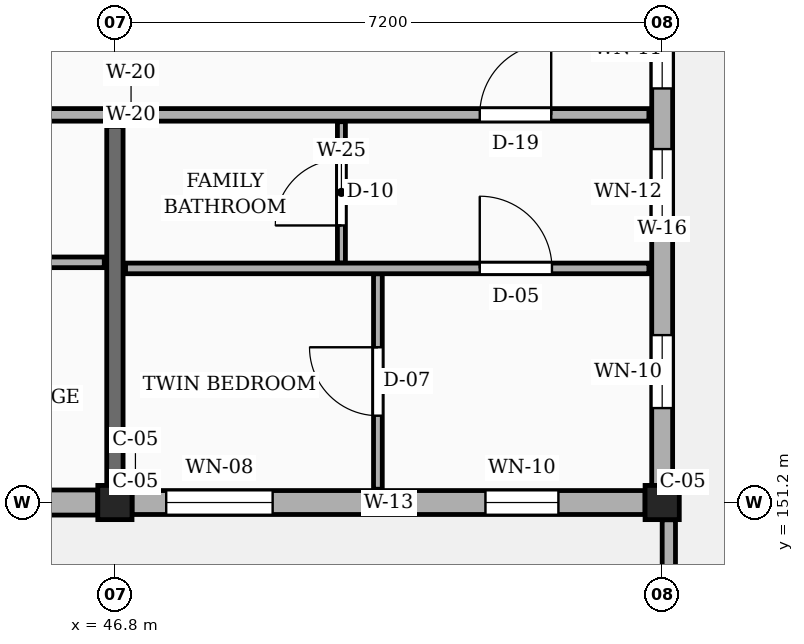
"""IFC4 building model, lengths in metres.
Left out: names, types, materials, properties, quantities, classifications, styles, units other than length and angle.
Written with IfcOpenShell. Run it as: python <this file> out.ifc"""

import sys

from ifc_helpers import new_model, si_unit, direction, frame, frame_2d, origin, origin_2d, place, context, subcontext, project, spatial, rectangle, extrude, element, fill, save


model = new_model("IFC4")
c1 = context("Model", 3, precision=1e-05, world=origin(), true_north=direction((0.0, 1.0)))
c2 = subcontext(c1, "Body", "Model", "MODEL_VIEW")
j1 = project(units=[si_unit("LENGTHUNIT", "METRE"), si_unit("PLANEANGLEUNIT", "RADIAN")], contexts=[c1])
p1 = place(None, origin())
s1 = spatial("IfcSite", under=j1, at=p1, CompositionType="ELEMENT")
p2 = place(p1, origin())
s2 = spatial("IfcBuilding", under=s1, at=p2, CompositionType="ELEMENT")
p3 = place(p2, frame((0.0, 0.0, 36.0)))
s3 = spatial("IfcBuildingStorey", under=s2, at=p3, CompositionType="ELEMENT", Elevation=36.0)
for number, where, z_axis, x_axis in (
    (1, (46.8, 151.2, 0.0), (0.0, 0.0, 1.0), (1.0, 0.0, 0.0)),
    (2, (54.0, 151.2, 0.0), (0.0, 0.0, 1.0), (1.0, 0.0, 0.0)),
):
    element("IfcColumn", number, at=place(p3, frame(where, z_axis=z_axis, x_axis=x_axis)), inside=s3, PredefinedType="COLUMN", context=c2, shape_type="SweptSolid", body=[
        extrude(rectangle(XDim=0.45, YDim=0.45, at=origin_2d()), origin(), (0.0, 0.0, 1.0), 3.15),
    ])
p4 = place(p3, frame((46.8, 151.425, 0.0), z_axis=(0.0, 0.0, 1.0), x_axis=(0.0, 1.0, 0.0)))
e3 = element("IfcWall", 3, at=p4, inside=s3, PredefinedType="SOLIDWALL", context=c2, shape_type="SweptSolid", body=[
    extrude(rectangle(XDim=4.725, YDim=0.215, at=frame_2d((2.362, 0.0))), origin(), (0.0, 0.0, 1.0), 2.185),
])
p5 = place(p3, frame((39.825, 151.2, 0.0), z_axis=(0.0, 0.0, 1.0), x_axis=(1.0, 0.0, 0.0)))
e4 = element("IfcWall", 4, at=p5, inside=s3, PredefinedType="SOLIDWALL", context=c2, shape_type="SweptSolid", body=[
    extrude(rectangle(XDim=6.75, YDim=0.33, at=frame_2d((3.375, 0.0))), origin(), (0.0, 0.0, 1.0), 2.455),
])
p6 = place(p5, frame((0.45, 0.0, 0.78)))
e5 = element("IfcOpeningElement", 5, at=p6, cuts=e4, PredefinedType="OPENING", context=c2, shape_type="SweptSolid", body=[
    extrude(rectangle(XDim=1.24, YDim=1.15, at=frame_2d((0.62, 0.575))), frame((0.0, 0.175, 0.0), z_axis=(0.0, -1.0, 0.0), x_axis=(1.0, 0.0, 0.0)), (0.0, 0.0, 1.0), 0.35),
])
p7 = place(p5, frame((4.65, 0.0, 0.78)))
e6 = element("IfcOpeningElement", 6, at=p7, cuts=e4, PredefinedType="OPENING", context=c2, shape_type="SweptSolid", body=[
    extrude(rectangle(XDim=1.4, YDim=1.15, at=frame_2d((0.7, 0.575))), frame((0.0, 0.175, 0.0), z_axis=(0.0, -1.0, 0.0), x_axis=(1.0, 0.0, 0.0)), (0.0, 0.0, 1.0), 0.35),
])
p8 = place(p3, frame((47.025, 151.2, 0.0), z_axis=(0.0, 0.0, 1.0), x_axis=(1.0, 0.0, 0.0)))
e7 = element("IfcWall", 7, at=p8, inside=s3, PredefinedType="SOLIDWALL", context=c2, shape_type="SweptSolid", body=[
    extrude(rectangle(XDim=6.75, YDim=0.315, at=frame_2d((3.375, 0.0))), origin(), (0.0, 0.0, 1.0), 2.455),
])
p9 = place(p8, frame((0.45, 0.0, 0.78)))
e8 = element("IfcOpeningElement", 8, at=p9, cuts=e7, PredefinedType="OPENING", context=c2, shape_type="SweptSolid", body=[
    extrude(rectangle(XDim=1.4, YDim=1.15, at=frame_2d((0.7, 0.575))), frame((0.0, 0.167, 0.0), z_axis=(0.0, -1.0, 0.0), x_axis=(1.0, 0.0, 0.0)), (0.0, 0.0, 1.0), 0.335),
])
p10 = place(p8, frame((4.65, 0.0, 0.78)))
e9 = element("IfcOpeningElement", 9, at=p10, cuts=e7, PredefinedType="OPENING", context=c2, shape_type="SweptSolid", body=[
    extrude(rectangle(XDim=0.96, YDim=1.26, at=frame_2d((0.48, 0.63))), frame((0.0, 0.167, 0.0), z_axis=(0.0, -1.0, 0.0), x_axis=(1.0, 0.0, 0.0)), (0.0, 0.0, 1.0), 0.335),
])
p11 = place(p3, frame((54.0, 151.425, 0.0), z_axis=(0.0, 0.0, 1.0), x_axis=(0.0, 1.0, 0.0)))
e10 = element("IfcWall", 10, at=p11, inside=s3, PredefinedType="SOLIDWALL", context=c2, shape_type="SweptSolid", body=[
    extrude(rectangle(XDim=6.75, YDim=0.275, at=frame_2d((3.375, 0.0))), origin(), (0.0, 0.0, 1.0), 2.455),
])
p12 = place(p11, frame((1.018, 0.0, 0.78)))
e11 = element("IfcOpeningElement", 11, at=p12, cuts=e10, PredefinedType="OPENING", context=c2, shape_type="SweptSolid", body=[
    extrude(rectangle(XDim=0.96, YDim=1.26, at=frame_2d((0.48, 0.63))), frame((0.0, 0.147, 0.0), z_axis=(0.0, -1.0, 0.0), x_axis=(1.0, 0.0, 0.0)), (0.0, 0.0, 1.0), 0.295),
])
p13 = place(p11, frame((3.305, 0.0, 0.78)))
e12 = element("IfcOpeningElement", 12, at=p13, cuts=e10, PredefinedType="OPENING", context=c2, shape_type="SweptSolid", body=[
    extrude(rectangle(XDim=1.12, YDim=1.26, at=frame_2d((0.56, 0.63))), frame((0.0, 0.147, 0.0), z_axis=(0.0, -1.0, 0.0), x_axis=(1.0, 0.0, 0.0)), (0.0, 0.0, 1.0), 0.295),
])
p14 = place(p11, frame((5.222, 0.0, 0.78)))
e13 = element("IfcOpeningElement", 13, at=p14, cuts=e10, PredefinedType="OPENING", context=c2, shape_type="SweptSolid", body=[
    extrude(rectangle(XDim=1.04, YDim=1.26, at=frame_2d((0.52, 0.63))), frame((0.0, 0.147, 0.0), z_axis=(0.0, -1.0, 0.0), x_axis=(1.0, 0.0, 0.0)), (0.0, 0.0, 1.0), 0.295),
])
p15 = place(p3, frame((54.087, 144.175, 0.0), z_axis=(0.0, 0.0, 1.0), x_axis=(0.0, 1.0, 0.0)))
e14 = element("IfcWall", 14, at=p15, inside=s3, PredefinedType="PARAPET", context=c2, shape_type="SweptSolid", body=[
    extrude(rectangle(XDim=6.798, YDim=0.175, at=frame_2d((3.399, 0.0))), origin(), (0.0, 0.0, 1.0), 1.1),
])
p16 = place(p3, frame((39.62, 156.3, 0.0), z_axis=(0.0, 0.0, 1.0), x_axis=(1.0, 0.0, 0.0)))
e15 = element("IfcWall", 15, at=p16, inside=s3, PredefinedType="PARTITIONING", context=c2, shape_type="SweptSolid", body=[
    extrude(rectangle(XDim=7.16, YDim=0.165, at=frame_2d((3.58, 0.0))), origin(), (0.0, 0.0, 1.0), 2.32),
])
p17 = place(p16, frame((4.78, 0.0, 0.0)))
e16 = element("IfcOpeningElement", 16, at=p17, cuts=e15, PredefinedType="OPENING", context=c2, shape_type="SweptSolid", body=[
    extrude(rectangle(XDim=1.0, YDim=2.15, at=frame_2d((0.5, 1.075))), frame((0.0, 0.093, 0.0), z_axis=(0.0, -1.0, 0.0), x_axis=(1.0, 0.0, 0.0)), (0.0, 0.0, 1.0), 0.185),
])
p18 = place(p3, frame((46.82, 156.3, 0.0), z_axis=(0.0, 0.0, 1.0), x_axis=(1.0, 0.0, 0.0)))
e17 = element("IfcWall", 17, at=p18, inside=s3, PredefinedType="PARTITIONING", context=c2, shape_type="SweptSolid", body=[
    extrude(rectangle(XDim=7.005, YDim=0.165, at=frame_2d((3.502, 0.0))), origin(), (0.0, 0.0, 1.0), 2.32),
])
p19 = place(p18, frame((4.78, 0.0, 0.0)))
e18 = element("IfcOpeningElement", 18, at=p19, cuts=e17, PredefinedType="OPENING", context=c2, shape_type="SweptSolid", body=[
    extrude(rectangle(XDim=0.94, YDim=2.12, at=frame_2d((0.47, 1.06))), frame((0.0, 0.093, 0.0), z_axis=(0.0, -1.0, 0.0), x_axis=(1.0, 0.0, 0.0)), (0.0, 0.0, 1.0), 0.185),
])
p20 = place(p3, frame((39.74, 154.36, 0.0), z_axis=(0.0, 0.0, 1.0), x_axis=(1.0, 0.0, 0.0)))
e19 = element("IfcWall", 19, at=p20, inside=s3, PredefinedType="PARTITIONING", context=c2, shape_type="SweptSolid", body=[
    extrude(rectangle(XDim=6.92, YDim=0.14, at=frame_2d((3.46, 0.0))), origin(), (0.0, 0.0, 1.0), 2.32),
])
p21 = place(p20, frame((4.66, 0.0, 0.0)))
e20 = element("IfcOpeningElement", 20, at=p21, cuts=e19, PredefinedType="OPENING", context=c2, shape_type="SweptSolid", body=[
    extrude(rectangle(XDim=0.92, YDim=2.1, at=frame_2d((0.46, 1.05))), frame((0.0, 0.08, 0.0), z_axis=(0.0, -1.0, 0.0), x_axis=(1.0, 0.0, 0.0)), (0.0, 0.0, 1.0), 0.16),
])
p22 = place(p3, frame((50.26, 151.375, 0.0), z_axis=(0.0, 0.0, 1.0), x_axis=(0.0, 1.0, 0.0)))
e21 = element("IfcWall", 21, at=p22, inside=s3, PredefinedType="PARTITIONING", context=c2, shape_type="SweptSolid", body=[
    extrude(rectangle(XDim=2.835, YDim=0.115, at=frame_2d((1.417, 0.0))), origin(), (0.0, 0.0, 1.0), 2.32),
])
p23 = place(p22, frame((0.968, 0.0, 0.0)))
e22 = element("IfcOpeningElement", 22, at=p23, cuts=e21, PredefinedType="OPENING", context=c2, shape_type="SweptSolid", body=[
    extrude(rectangle(XDim=0.9, YDim=2.1, at=frame_2d((0.45, 1.05))), frame((0.0, 0.067, 0.0), z_axis=(0.0, -1.0, 0.0), x_axis=(1.0, 0.0, 0.0)), (0.0, 0.0, 1.0), 0.135),
])
p24 = place(p3, frame((49.78, 154.35, 0.0), z_axis=(0.0, 0.0, 1.0), x_axis=(0.0, 1.0, 0.0)))
e23 = element("IfcWall", 23, at=p24, inside=s3, PredefinedType="PARTITIONING", context=c2, shape_type="SweptSolid", body=[
    extrude(rectangle(XDim=1.86, YDim=0.105, at=frame_2d((0.93, 0.0))), origin(), (0.0, 0.0, 1.0), 2.32),
])
p25 = place(p24, frame((0.495, 0.0, 0.0)))
e24 = element("IfcOpeningElement", 24, at=p25, cuts=e23, PredefinedType="OPENING", context=c2, shape_type="SweptSolid", body=[
    extrude(rectangle(XDim=0.87, YDim=2.05, at=frame_2d((0.435, 1.025))), frame((0.0, 0.062, 0.0), z_axis=(0.0, -1.0, 0.0), x_axis=(1.0, 0.0, 0.0)), (0.0, 0.0, 1.0), 0.125),
])
p26 = place(p3, frame((46.94, 154.28, 0.0), z_axis=(0.0, 0.0, 1.0), x_axis=(1.0, 0.0, 0.0)))
e25 = element("IfcWall", 25, at=p26, inside=s3, PredefinedType="PARTITIONING", context=c2, shape_type="SweptSolid", body=[
    extrude(rectangle(XDim=6.885, YDim=0.14, at=frame_2d((3.442, 0.0))), origin(), (0.0, 0.0, 1.0), 2.32),
])
p27 = place(p26, frame((4.66, 0.0, 0.0)))
e26 = element("IfcOpeningElement", 26, at=p27, cuts=e25, PredefinedType="OPENING", context=c2, shape_type="SweptSolid", body=[
    extrude(rectangle(XDim=0.95, YDim=2.1, at=frame_2d((0.475, 1.05))), frame((0.0, 0.08, 0.0), z_axis=(0.0, -1.0, 0.0), x_axis=(1.0, 0.0, 0.0)), (0.0, 0.0, 1.0), 0.16),
])
p28 = place(p9, origin())
e27 = element("IfcWindow", 27, at=p28, inside=s3, PartitioningType="SINGLE_PANEL", PredefinedType="WINDOW", context=c2, shape_type="SweptSolid", body=[
    extrude(rectangle(XDim=1.4, YDim=1.15, at=frame_2d((0.7, 0.575))), frame((0.0, 0.03, 0.0), z_axis=(0.0, -1.0, 0.0), x_axis=(1.0, 0.0, 0.0)), (0.0, 0.0, 1.0), 0.06),
])
fill(e8, e27)
p29 = place(p10, origin())
e28 = element("IfcWindow", 28, at=p29, inside=s3, PartitioningType="SINGLE_PANEL", PredefinedType="WINDOW", context=c2, shape_type="SweptSolid", body=[
    extrude(rectangle(XDim=0.96, YDim=1.26, at=frame_2d((0.48, 0.63))), frame((0.0, 0.03, 0.0), z_axis=(0.0, -1.0, 0.0), x_axis=(1.0, 0.0, 0.0)), (0.0, 0.0, 1.0), 0.06),
])
fill(e9, e28)
p30 = place(p12, origin())
e29 = element("IfcWindow", 29, at=p30, inside=s3, PartitioningType="SINGLE_PANEL", PredefinedType="WINDOW", context=c2, shape_type="SweptSolid", body=[
    extrude(rectangle(XDim=0.96, YDim=1.26, at=frame_2d((0.48, 0.63))), frame((0.0, 0.03, 0.0), z_axis=(0.0, -1.0, 0.0), x_axis=(1.0, 0.0, 0.0)), (0.0, 0.0, 1.0), 0.06),
])
fill(e11, e29)
p31 = place(p13, origin())
e30 = element("IfcWindow", 30, at=p31, inside=s3, PartitioningType="SINGLE_PANEL", PredefinedType="WINDOW", context=c2, shape_type="SweptSolid", body=[
    extrude(rectangle(XDim=1.12, YDim=1.26, at=frame_2d((0.56, 0.63))), frame((0.0, 0.03, 0.0), z_axis=(0.0, -1.0, 0.0), x_axis=(1.0, 0.0, 0.0)), (0.0, 0.0, 1.0), 0.06),
])
fill(e12, e30)
p32 = place(p14, origin())
e31 = element("IfcWindow", 31, at=p32, inside=s3, PartitioningType="SINGLE_PANEL", PredefinedType="WINDOW", context=c2, shape_type="SweptSolid", body=[
    extrude(rectangle(XDim=1.04, YDim=1.26, at=frame_2d((0.52, 0.63))), frame((0.0, 0.03, 0.0), z_axis=(0.0, -1.0, 0.0), x_axis=(1.0, 0.0, 0.0)), (0.0, 0.0, 1.0), 0.06),
])
fill(e13, e31)
p33 = place(p19, origin())
e32 = element("IfcDoor", 32, at=p33, inside=s3, OperationType="SINGLE_SWING_RIGHT", PredefinedType="DOOR", context=c2, shape_type="SweptSolid", body=[
    extrude(rectangle(XDim=0.94, YDim=2.12, at=frame_2d((0.47, 1.06))), frame((0.0, 0.025, 0.0), z_axis=(0.0, -1.0, 0.0), x_axis=(1.0, 0.0, 0.0)), (0.0, 0.0, 1.0), 0.05),
])
fill(e18, e32)
p34 = place(p23, origin())
e33 = element("IfcDoor", 33, at=p34, inside=s3, OperationType="SINGLE_SWING_RIGHT", PredefinedType="DOOR", context=c2, shape_type="SweptSolid", body=[
    extrude(rectangle(XDim=0.9, YDim=2.1, at=frame_2d((0.45, 1.05))), frame((0.0, 0.025, 0.0), z_axis=(0.0, -1.0, 0.0), x_axis=(1.0, 0.0, 0.0)), (0.0, 0.0, 1.0), 0.05),
])
fill(e22, e33)
p35 = place(p25, origin())
e34 = element("IfcDoor", 34, at=p35, inside=s3, OperationType="SINGLE_SWING_LEFT", PredefinedType="DOOR", context=c2, shape_type="SweptSolid", body=[
    extrude(rectangle(XDim=0.87, YDim=2.05, at=frame_2d((0.435, 1.025))), frame((0.0, 0.025, 0.0), z_axis=(0.0, -1.0, 0.0), x_axis=(1.0, 0.0, 0.0)), (0.0, 0.0, 1.0), 0.05),
])
fill(e24, e34)
p36 = place(p27, origin())
e35 = element("IfcDoor", 35, at=p36, inside=s3, OperationType="SINGLE_SWING_LEFT", PredefinedType="DOOR", context=c2, shape_type="SweptSolid", body=[
    extrude(rectangle(XDim=0.95, YDim=2.1, at=frame_2d((0.475, 1.05))), frame((0.0, 0.025, 0.0), z_axis=(0.0, -1.0, 0.0), x_axis=(1.0, 0.0, 0.0)), (0.0, 0.0, 1.0), 0.05),
])
fill(e26, e35)
save(model, sys.argv[1])
